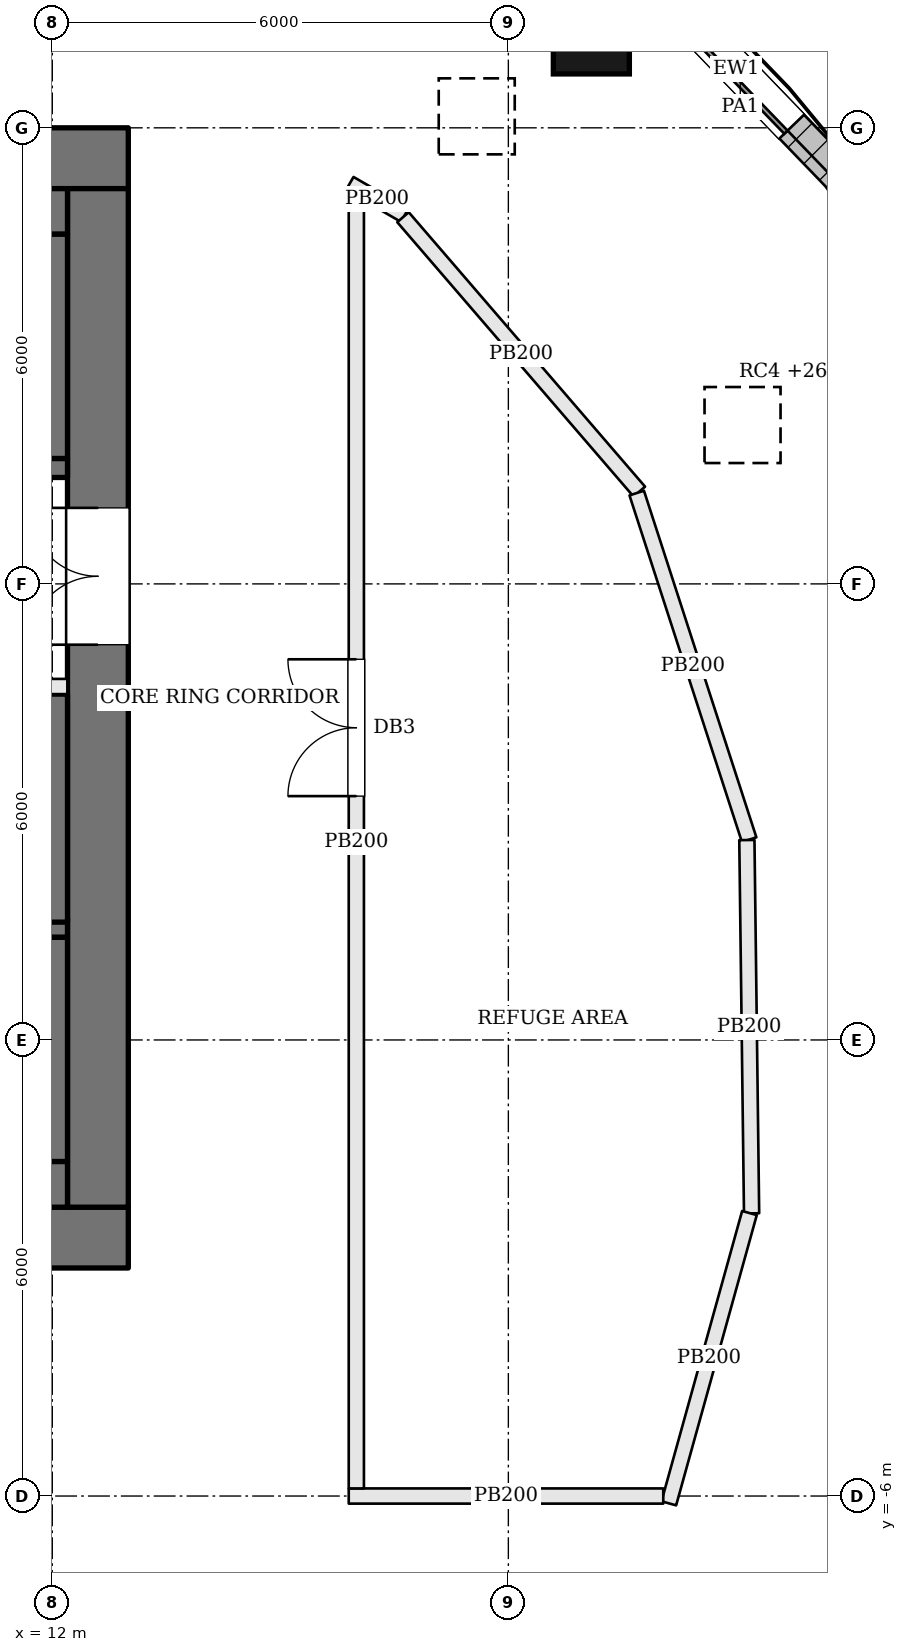
"""IFC4 building model, lengths in metres.
Left out: names, types, materials, properties, quantities, classifications, styles, units other than length and angle.
Written with IfcOpenShell. Run it as: python <this file> out.ifc"""

import sys

from ifc_helpers import new_model, si_unit, direction, frame, frame_2d, origin, origin_2d, place, context, subcontext, project, spatial, rectangle, extrude, element, fill, save


model = new_model("IFC4")
c1 = context("Model", 3, precision=1e-05, world=origin(), true_north=direction((0.0, 1.0)))
c2 = subcontext(c1, "Body", "Model", "MODEL_VIEW")
j1 = project(units=[si_unit("LENGTHUNIT", "METRE"), si_unit("PLANEANGLEUNIT", "RADIAN")], contexts=[c1])
p1 = place(None, origin())
s1 = spatial("IfcSite", under=j1, at=p1, CompositionType="ELEMENT")
p2 = place(p1, origin())
s2 = spatial("IfcBuilding", under=s1, at=p2, CompositionType="ELEMENT")
p3 = place(p2, frame((0.0, 0.0, 264.3)))
s3 = spatial("IfcBuildingStorey", under=s2, at=p3, CompositionType="ELEMENT", Elevation=264.3)
p4 = place(p3, frame((-13.0, 11.6, 0.0), z_axis=(0.0, 0.0, 1.0), x_axis=(1.0, 0.0, 0.0)))
e1 = element("IfcWall", 1, at=p4, inside=s3, PredefinedType="SHEAR", context=c2, shape_type="SweptSolid", body=[
    extrude(rectangle(XDim=26.0, YDim=0.8, at=frame_2d((13.0, 0.0))), origin(), (0.0, 0.0, 1.0), 4.5),
])
p5 = place(p4, frame((9.125, 0.0, 0.0)))
e2 = element("IfcOpeningElement", 2, at=p5, cuts=e1, PredefinedType="OPENING", context=c2, shape_type="SweptSolid", body=[
    extrude(rectangle(XDim=1.2, YDim=2.1, at=frame_2d((0.6, 1.05))), frame((0.0, 0.41, 0.0), z_axis=(0.0, -1.0, 0.0), x_axis=(1.0, 0.0, 0.0)), (0.0, 0.0, 1.0), 0.82),
])
p6 = place(p4, frame((12.375, 0.0, 0.0)))
e3 = element("IfcOpeningElement", 3, at=p6, cuts=e1, PredefinedType="OPENING", context=c2, shape_type="SweptSolid", body=[
    extrude(rectangle(XDim=1.2, YDim=2.1, at=frame_2d((0.6, 1.05))), frame((0.0, 0.41, 0.0), z_axis=(0.0, -1.0, 0.0), x_axis=(1.0, 0.0, 0.0)), (0.0, 0.0, 1.0), 0.82),
])
p7 = place(p4, frame((15.9, 0.0, 0.0)))
e4 = element("IfcOpeningElement", 4, at=p7, cuts=e1, PredefinedType="OPENING", context=c2, shape_type="SweptSolid", body=[
    extrude(rectangle(XDim=0.7, YDim=2.1, at=frame_2d((0.35, 1.05))), frame((0.0, 0.41, 0.0), z_axis=(0.0, -1.0, 0.0), x_axis=(1.0, 0.0, 0.0)), (0.0, 0.0, 1.0), 0.82),
])
p8 = place(p4, frame((6.88, 0.0, 0.0)))
e5 = element("IfcOpeningElement", 5, at=p8, cuts=e1, PredefinedType="OPENING", context=c2, shape_type="SweptSolid", body=[
    extrude(rectangle(XDim=1.0, YDim=2.1, at=frame_2d((0.5, 1.05))), frame((0.0, 0.41, 0.0), z_axis=(0.0, -1.0, 0.0), x_axis=(1.0, 0.0, 0.0)), (0.0, 0.0, 1.0), 0.82),
])
p9 = place(p4, frame((18.12, 0.0, 0.0)))
e6 = element("IfcOpeningElement", 6, at=p9, cuts=e1, PredefinedType="OPENING", context=c2, shape_type="SweptSolid", body=[
    extrude(rectangle(XDim=1.0, YDim=2.1, at=frame_2d((0.5, 1.05))), frame((0.0, 0.41, 0.0), z_axis=(0.0, -1.0, 0.0), x_axis=(1.0, 0.0, 0.0)), (0.0, 0.0, 1.0), 0.82),
])
p10 = place(p3, frame((-13.0, -2.6, 0.0), z_axis=(0.0, 0.0, 1.0), x_axis=(1.0, 0.0, 0.0)))
e7 = element("IfcWall", 7, at=p10, inside=s3, PredefinedType="SHEAR", context=c2, shape_type="SweptSolid", body=[
    extrude(rectangle(XDim=26.0, YDim=0.8, at=frame_2d((13.0, 0.0))), origin(), (0.0, 0.0, 1.0), 4.5),
])
p11 = place(p10, frame((8.975, 0.0, 0.0)))
e8 = element("IfcOpeningElement", 8, at=p11, cuts=e7, PredefinedType="OPENING", context=c2, shape_type="SweptSolid", body=[
    extrude(rectangle(XDim=0.7, YDim=2.1, at=frame_2d((0.35, 1.05))), frame((0.0, 0.41, 0.0), z_axis=(0.0, -1.0, 0.0), x_axis=(1.0, 0.0, 0.0)), (0.0, 0.0, 1.0), 0.82),
])
p12 = place(p10, frame((12.0, 0.0, 0.0)))
e9 = element("IfcOpeningElement", 9, at=p12, cuts=e7, PredefinedType="OPENING", context=c2, shape_type="SweptSolid", body=[
    extrude(rectangle(XDim=1.2, YDim=2.1, at=frame_2d((0.6, 1.05))), frame((0.0, 0.41, 0.0), z_axis=(0.0, -1.0, 0.0), x_axis=(1.0, 0.0, 0.0)), (0.0, 0.0, 1.0), 0.82),
])
p13 = place(p10, frame((15.675, 0.0, 0.0)))
e10 = element("IfcOpeningElement", 10, at=p13, cuts=e7, PredefinedType="OPENING", context=c2, shape_type="SweptSolid", body=[
    extrude(rectangle(XDim=1.2, YDim=2.1, at=frame_2d((0.6, 1.05))), frame((0.0, 0.41, 0.0), z_axis=(0.0, -1.0, 0.0), x_axis=(1.0, 0.0, 0.0)), (0.0, 0.0, 1.0), 0.82),
])
p14 = place(p10, frame((6.88, 0.0, 0.0)))
e11 = element("IfcOpeningElement", 11, at=p14, cuts=e7, PredefinedType="OPENING", context=c2, shape_type="SweptSolid", body=[
    extrude(rectangle(XDim=1.0, YDim=2.1, at=frame_2d((0.5, 1.05))), frame((0.0, 0.41, 0.0), z_axis=(0.0, -1.0, 0.0), x_axis=(1.0, 0.0, 0.0)), (0.0, 0.0, 1.0), 0.82),
])
p15 = place(p10, frame((18.12, 0.0, 0.0)))
e12 = element("IfcOpeningElement", 12, at=p15, cuts=e7, PredefinedType="OPENING", context=c2, shape_type="SweptSolid", body=[
    extrude(rectangle(XDim=1.0, YDim=2.1, at=frame_2d((0.5, 1.05))), frame((0.0, 0.41, 0.0), z_axis=(0.0, -1.0, 0.0), x_axis=(1.0, 0.0, 0.0)), (0.0, 0.0, 1.0), 0.82),
])
p16 = place(p3, frame((12.6, -2.2, 0.0), z_axis=(0.0, 0.0, 1.0), x_axis=(0.0, 1.0, 0.0)))
e13 = element("IfcWall", 13, at=p16, inside=s3, PredefinedType="SHEAR", context=c2, shape_type="SweptSolid", body=[
    extrude(rectangle(XDim=13.4, YDim=0.8, at=frame_2d((6.7, 0.0))), origin(), (0.0, 0.0, 1.0), 4.5),
])
p17 = place(p16, frame((7.4, 0.0, 0.0)))
e14 = element("IfcOpeningElement", 14, at=p17, cuts=e13, PredefinedType="OPENING", context=c2, shape_type="SweptSolid", body=[
    extrude(rectangle(XDim=1.8, YDim=2.1, at=frame_2d((0.9, 1.05))), frame((0.0, 0.41, 0.0), z_axis=(0.0, -1.0, 0.0), x_axis=(1.0, 0.0, 0.0)), (0.0, 0.0, 1.0), 0.82),
])
p18 = place(p3, frame((22.879, 8.787, -0.585), z_axis=(-0.391333642687, -0.151718841645, 0.907655977335), x_axis=(0.361480683506, -0.932379598367, 0.0)))
e15 = element("IfcColumn", 15, at=p18, inside=s3, PredefinedType="COLUMN", context=c2, shape_type="SweptSolid", body=[
    extrude(rectangle(XDim=1.0, YDim=1.0, at=origin_2d()), origin(), (0.0, 0.0, 1.0), 4.594),
])
p19 = place(p3, frame((19.092, 13.209, -0.594), z_axis=(-0.329610632582, -0.231266388475, 0.915353859691), x_axis=(0.574360318683, -0.818602604639, 0.0)))
e16 = element("IfcColumn", 16, at=p19, inside=s3, PredefinedType="COLUMN", context=c2, shape_type="SweptSolid", body=[
    extrude(rectangle(XDim=1.0, YDim=1.0, at=origin_2d()), origin(), (0.0, 0.0, 1.0), 4.575),
])
p20 = place(p3, frame((23.185, -8.21, -0.585), z_axis=(-0.395577824141, 0.142730980726, 0.907273967547), x_axis=(-0.339399243932, -0.940642415171, 0.0)))
e17 = element("IfcColumn", 17, at=p20, inside=s3, PredefinedType="COLUMN", context=c2, shape_type="SweptSolid", body=[
    extrude(rectangle(XDim=1.0, YDim=1.0, at=origin_2d()), origin(), (0.0, 0.0, 1.0), 4.596),
])
p21 = place(p3, frame((24.386, 7.874, 0.0), z_axis=(0.0, 0.0, 1.0), x_axis=(-0.502055516261, 0.864835393929, 0.0)))
e18 = element("IfcWall", 18, at=p21, inside=s3, PredefinedType="SOLIDWALL", context=c2, shape_type="SweptSolid", body=[
    extrude(rectangle(XDim=4.049, YDim=0.45, at=frame_2d((2.025, 0.0))), origin(), (0.0, 0.0, 1.0), 4.3),
])
p22 = place(p21, frame((0.975, 0.0, 1.2)))
e19 = element("IfcOpeningElement", 19, at=p22, cuts=e18, PredefinedType="OPENING", context=c2, shape_type="SweptSolid", body=[
    extrude(rectangle(XDim=2.1, YDim=1.8, at=frame_2d((1.05, 0.9))), frame((0.0, 0.235, 0.0), z_axis=(0.0, -1.0, 0.0), x_axis=(1.0, 0.0, 0.0)), (0.0, 0.0, 1.0), 0.47),
])
p23 = place(p3, frame((22.386, 11.333, 0.0), z_axis=(0.0, 0.0, 1.0), x_axis=(-0.694225992979, 0.719757091436, 0.0)))
e20 = element("IfcWall", 20, at=p23, inside=s3, PredefinedType="SOLIDWALL", context=c2, shape_type="SweptSolid", body=[
    extrude(rectangle(XDim=3.997, YDim=0.45, at=frame_2d((1.999, 0.0))), origin(), (0.0, 0.0, 1.0), 4.3),
])
p24 = place(p23, frame((0.948, 0.0, 1.2)))
e21 = element("IfcOpeningElement", 21, at=p24, cuts=e20, PredefinedType="OPENING", context=c2, shape_type="SweptSolid", body=[
    extrude(rectangle(XDim=2.1, YDim=1.8, at=frame_2d((1.05, 0.9))), frame((0.0, 0.235, 0.0), z_axis=(0.0, -1.0, 0.0), x_axis=(1.0, 0.0, 0.0)), (0.0, 0.0, 1.0), 0.47),
])
p25 = place(p3, frame((22.394, 11.433, 4.5), z_axis=(0.0, 0.0, 1.0), x_axis=(-0.694246491391, 0.719737319576, 0.0)))
e22 = element("IfcWall", 22, at=p25, inside=s3, PredefinedType="PARAPET", context=c2, shape_type="SweptSolid", body=[
    extrude(rectangle(XDim=3.869, YDim=0.3, at=frame_2d((1.935, 0.0))), origin(), (0.0, 0.0, 1.0), 1.1),
])
p26 = place(p3, frame((12.2, 7.525, 0.0), z_axis=(0.0, 0.0, 1.0), x_axis=(-1.0, 0.0, 0.0)))
e23 = element("IfcWall", 23, at=p26, inside=s3, PredefinedType="SOLIDWALL", context=c2, shape_type="SweptSolid", body=[
    extrude(rectangle(XDim=7.1, YDim=0.25, at=frame_2d((3.55, 0.0))), origin(), (0.0, 0.0, 1.0), 4.3),
])
p27 = place(p26, frame((5.8, 0.0, 0.0)))
e24 = element("IfcOpeningElement", 24, at=p27, cuts=e23, PredefinedType="OPENING", context=c2, shape_type="SweptSolid", body=[
    extrude(rectangle(XDim=1.2, YDim=2.1, at=frame_2d((0.6, 1.05))), frame((0.0, 0.135, 0.0), z_axis=(0.0, -1.0, 0.0), x_axis=(1.0, 0.0, 0.0)), (0.0, 0.0, 1.0), 0.27),
])
p28 = place(p3, frame((12.2, 4.65, 0.0), z_axis=(0.0, 0.0, 1.0), x_axis=(-1.0, 0.0, 0.0)))
e25 = element("IfcWall", 25, at=p28, inside=s3, PredefinedType="SOLIDWALL", context=c2, shape_type="SweptSolid", body=[
    extrude(rectangle(XDim=7.1, YDim=0.2, at=frame_2d((3.55, 0.0))), origin(), (0.0, 0.0, 1.0), 4.3),
])
p29 = place(p28, frame((4.4, 0.0, 0.0)))
e26 = element("IfcOpeningElement", 26, at=p29, cuts=e25, PredefinedType="OPENING", context=c2, shape_type="SweptSolid", body=[
    extrude(rectangle(XDim=1.2, YDim=2.1, at=frame_2d((0.6, 1.05))), frame((0.0, 0.11, 0.0), z_axis=(0.0, -1.0, 0.0), x_axis=(1.0, 0.0, 0.0)), (0.0, 0.0, 1.0), 0.22),
])
p30 = place(p28, frame((1.1, 0.0, 0.0)))
e27 = element("IfcOpeningElement", 27, at=p30, cuts=e25, PredefinedType="OPENING", context=c2, shape_type="SweptSolid", body=[
    extrude(rectangle(XDim=1.2, YDim=2.1, at=frame_2d((0.6, 1.05))), frame((0.0, 0.11, 0.0), z_axis=(0.0, -1.0, 0.0), x_axis=(1.0, 0.0, 0.0)), (0.0, 0.0, 1.0), 0.22),
])
p31 = place(p3, frame((12.2, 1.475, 0.0), z_axis=(0.0, 0.0, 1.0), x_axis=(-1.0, 0.0, 0.0)))
e28 = element("IfcWall", 28, at=p31, inside=s3, PredefinedType="SOLIDWALL", context=c2, shape_type="SweptSolid", body=[
    extrude(rectangle(XDim=7.1, YDim=0.25, at=frame_2d((3.55, 0.0))), origin(), (0.0, 0.0, 1.0), 4.3),
])
p32 = place(p31, frame((5.8, 0.0, 0.0)))
e29 = element("IfcOpeningElement", 29, at=p32, cuts=e28, PredefinedType="OPENING", context=c2, shape_type="SweptSolid", body=[
    extrude(rectangle(XDim=1.2, YDim=2.1, at=frame_2d((0.6, 1.05))), frame((0.0, 0.135, 0.0), z_axis=(0.0, -1.0, 0.0), x_axis=(1.0, 0.0, 0.0)), (0.0, 0.0, 1.0), 0.27),
])
p33 = place(p3, frame((12.2, 10.9, 0.0), z_axis=(0.0, 0.0, 1.0), x_axis=(-1.0, 0.0, 0.0)))
e30 = element("IfcWall", 30, at=p33, inside=s3, PredefinedType="SOLIDWALL", context=c2, shape_type="SweptSolid", body=[
    extrude(rectangle(XDim=6.08, YDim=0.6, at=frame_2d((3.04, 0.0))), origin(), (0.0, 0.0, 1.0), 4.3),
])
p34 = place(p3, frame((11.9, 10.6, 0.0), z_axis=(0.0, 0.0, 1.0), x_axis=(0.0, -1.0, 0.0)))
e31 = element("IfcWall", 31, at=p34, inside=s3, PredefinedType="SOLIDWALL", context=c2, shape_type="SweptSolid", body=[
    extrude(rectangle(XDim=2.95, YDim=0.6, at=frame_2d((1.475, 0.0))), origin(), (0.0, 0.0, 1.0), 4.3),
])
p35 = place(p3, frame((11.9, 4.55, 0.0), z_axis=(0.0, 0.0, 1.0), x_axis=(0.0, -1.0, 0.0)))
e32 = element("IfcWall", 32, at=p35, inside=s3, PredefinedType="SOLIDWALL", context=c2, shape_type="SweptSolid", body=[
    extrude(rectangle(XDim=3.0, YDim=0.6, at=frame_2d((1.5, 0.0))), origin(), (0.0, 0.0, 1.0), 4.3),
])
p36 = place(p3, frame((11.9, 1.35, 0.0), z_axis=(0.0, 0.0, 1.0), x_axis=(0.0, -1.0, 0.0)))
e33 = element("IfcWall", 33, at=p36, inside=s3, PredefinedType="SOLIDWALL", context=c2, shape_type="SweptSolid", body=[
    extrude(rectangle(XDim=2.95, YDim=0.6, at=frame_2d((1.475, 0.0))), origin(), (0.0, 0.0, 1.0), 4.3),
])
p37 = place(p3, frame((12.2, -1.9, 0.0), z_axis=(0.0, 0.0, 1.0), x_axis=(-1.0, 0.0, 0.0)))
e34 = element("IfcWall", 34, at=p37, inside=s3, PredefinedType="SOLIDWALL", context=c2, shape_type="SweptSolid", body=[
    extrude(rectangle(XDim=6.08, YDim=0.6, at=frame_2d((3.04, 0.0))), origin(), (0.0, 0.0, 1.0), 4.3),
])
p38 = place(p3, frame((15.913, 11.267, 0.0), z_axis=(0.0, 0.0, 1.0), x_axis=(0.866219676164, -0.4996633593, 0.0)))
e35 = element("IfcWall", 35, at=p38, inside=s3, PredefinedType="PARTITIONING", context=c2, shape_type="SweptSolid", body=[
    extrude(rectangle(XDim=0.834, YDim=0.2, at=frame_2d((0.417, 0.0))), origin(), (0.0, 0.0, 1.0), 4.3),
])
p39 = place(p3, frame((16.614, 10.824, 0.0), z_axis=(0.0, 0.0, 1.0), x_axis=(0.652570543166, -0.757727976382, 0.0)))
e36 = element("IfcWall", 36, at=p39, inside=s3, PredefinedType="PARTITIONING", context=c2, shape_type="SweptSolid", body=[
    extrude(rectangle(XDim=4.764, YDim=0.2, at=frame_2d((2.382, 0.0))), origin(), (0.0, 0.0, 1.0), 4.3),
])
p40 = place(p3, frame((19.689, 7.195, 0.0), z_axis=(0.0, 0.0, 1.0), x_axis=(0.308517152125, -0.951218779695, 0.0)))
e37 = element("IfcWall", 37, at=p40, inside=s3, PredefinedType="PARTITIONING", context=c2, shape_type="SweptSolid", body=[
    extrude(rectangle(XDim=4.794, YDim=0.2, at=frame_2d((2.397, 0.0))), origin(), (0.0, 0.0, 1.0), 4.3),
])
p41 = place(p3, frame((21.138, 2.63, 0.0), z_axis=(0.0, 0.0, 1.0), x_axis=(0.012626385888, -0.999920284012, 0.0)))
e38 = element("IfcWall", 38, at=p41, inside=s3, PredefinedType="PARTITIONING", context=c2, shape_type="SweptSolid", body=[
    extrude(rectangle(XDim=4.911, YDim=0.2, at=frame_2d((2.456, 0.0))), origin(), (0.0, 0.0, 1.0), 4.3),
])
p42 = place(p3, frame((21.172, -2.277, 0.0), z_axis=(0.0, 0.0, 1.0), x_axis=(-0.267701048026, -0.963502023291, 0.0)))
e39 = element("IfcWall", 39, at=p42, inside=s3, PredefinedType="PARTITIONING", context=c2, shape_type="SweptSolid", body=[
    extrude(rectangle(XDim=3.964, YDim=0.2, at=frame_2d((1.982, 0.0))), origin(), (0.0, 0.0, 1.0), 4.3),
])
p43 = place(p3, frame((20.038, -6.0, 0.0), z_axis=(0.0, 0.0, 1.0), x_axis=(-1.0, 0.0, 0.0)))
e40 = element("IfcWall", 40, at=p43, inside=s3, PredefinedType="PARTITIONING", context=c2, shape_type="SweptSolid", body=[
    extrude(rectangle(XDim=4.138, YDim=0.2, at=frame_2d((2.069, 0.0))), origin(), (0.0, 0.0, 1.0), 4.3),
])
p44 = place(p3, frame((16.0, -5.9, 0.0), z_axis=(0.0, 0.0, 1.0), x_axis=(0.0, 1.0, 0.0)))
e41 = element("IfcWall", 41, at=p44, inside=s3, PredefinedType="PARTITIONING", context=c2, shape_type="SweptSolid", body=[
    extrude(rectangle(XDim=17.017, YDim=0.2, at=frame_2d((8.508, 0.0))), origin(), (0.0, 0.0, 1.0), 4.3),
])
p45 = place(p44, frame((9.108, 0.0, 0.0)))
e42 = element("IfcOpeningElement", 42, at=p45, cuts=e41, PredefinedType="OPENING", context=c2, shape_type="SweptSolid", body=[
    extrude(rectangle(XDim=1.8, YDim=2.1, at=frame_2d((0.9, 1.05))), frame((0.0, 0.11, 0.0), z_axis=(0.0, -1.0, 0.0), x_axis=(1.0, 0.0, 0.0)), (0.0, 0.0, 1.0), 0.22),
])
p46 = place(p24, origin())
e43 = element("IfcWindow", 43, at=p46, inside=s3, PartitioningType="SINGLE_PANEL", PredefinedType="WINDOW", context=c2, shape_type="SweptSolid", body=[
    extrude(rectangle(XDim=2.1, YDim=1.8, at=frame_2d((1.05, 0.9))), frame((0.0, 0.135, 0.0), z_axis=(0.0, -1.0, 0.0), x_axis=(1.0, 0.0, 0.0)), (0.0, 0.0, 1.0), 0.06),
])
fill(e21, e43)
p47 = place(p17, origin())
e44 = element("IfcDoor", 44, at=p47, inside=s3, OperationType="DOUBLE_DOOR_SINGLE_SWING", PredefinedType="DOOR", context=c2, shape_type="SweptSolid", body=[
    extrude(rectangle(XDim=1.8, YDim=2.1, at=frame_2d((0.9, 1.05))), frame((0.0, 0.025, 0.0), z_axis=(0.0, -1.0, 0.0), x_axis=(1.0, 0.0, 0.0)), (0.0, 0.0, 1.0), 0.05),
])
fill(e14, e44)
p48 = place(p45, origin())
e45 = element("IfcDoor", 45, at=p48, inside=s3, OperationType="DOUBLE_DOOR_SINGLE_SWING", PredefinedType="DOOR", context=c2, shape_type="SweptSolid", body=[
    extrude(rectangle(XDim=1.8, YDim=2.1, at=frame_2d((0.9, 1.05))), frame((0.0, 0.025, 0.0), z_axis=(0.0, -1.0, 0.0), x_axis=(1.0, 0.0, 0.0)), (0.0, 0.0, 1.0), 0.05),
])
fill(e42, e45)
save(model, sys.argv[1])
